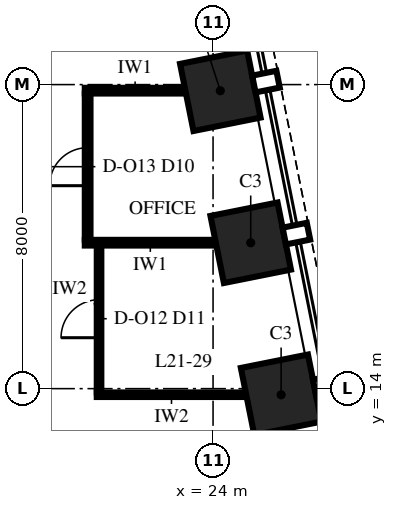
"""IFC4 building model, lengths in metres.
Left out: names, types, materials, properties, quantities, classifications, styles, units other than length and angle.
Written with IfcOpenShell. Run it as: python <this file> out.ifc"""

import sys

from ifc_helpers import new_model, si_unit, direction, frame, frame_2d, origin, origin_2d, place, context, subcontext, project, spatial, rectangle, extrude, element, fill, save


model = new_model("IFC4")
c1 = context("Model", 3, precision=1e-05, world=origin(), true_north=direction((0.0, 1.0)))
c2 = subcontext(c1, "Body", "Model", "MODEL_VIEW")
j1 = project(units=[si_unit("LENGTHUNIT", "METRE"), si_unit("PLANEANGLEUNIT", "RADIAN")], contexts=[c1])
p1 = place(None, origin())
s1 = spatial("IfcSite", under=j1, at=p1, CompositionType="ELEMENT")
p2 = place(p1, origin())
s2 = spatial("IfcBuilding", under=s1, at=p2, CompositionType="ELEMENT")
p3 = place(p2, frame((0.0, 0.0, 98.0)))
s3 = spatial("IfcBuildingStorey", under=s2, at=p3, CompositionType="ELEMENT", Elevation=98.0)
for number, where, z_axis, x_axis in (
    (1, (25.791, 13.838, 0.0), (0.0, 0.0, 1.0), (-0.196, 0.981, 0.0)),
    (2, (24.991, 17.838, 0.0), (0.0, 0.0, 1.0), (-0.196, 0.981, 0.0)),
    (3, (24.191, 21.838, 0.0), (0.0, 0.0, 1.0), (-0.196, 0.981, 0.0)),
):
    element("IfcColumn", number, at=place(p3, frame(where, z_axis=z_axis, x_axis=x_axis)), inside=s3, PredefinedType="COLUMN", context=c2, shape_type="SweptSolid", body=[
        extrude(rectangle(XDim=1.8, YDim=1.8, at=origin_2d()), origin(), (0.0, 0.0, 1.0), 5.0),
    ])
p4 = place(p3, frame((20.94, 13.84, 0.0), z_axis=(0.0, 0.0, 1.0), x_axis=(1.0, 0.0, 0.0)))
e4 = element("IfcWall", 4, at=p4, inside=s3, PredefinedType="PARTITIONING", context=c2, shape_type="SweptSolid", body=[
    extrude(rectangle(XDim=3.933, YDim=0.12, at=frame_2d((1.966, 0.0))), origin(), (0.0, 0.0, 1.0), 4.25),
])
p5 = place(p3, frame((20.625, 17.84, 0.0), z_axis=(0.0, 0.0, 1.0), x_axis=(1.0, 0.0, 0.0)))
e5 = element("IfcWall", 5, at=p5, inside=s3, PredefinedType="PARTITIONING", context=c2, shape_type="SweptSolid", body=[
    extrude(rectangle(XDim=3.448, YDim=0.15, at=frame_2d((1.724, 0.0))), origin(), (0.0, 0.0, 1.0), 4.25),
])
p6 = place(p3, frame((20.625, 21.84, 0.0), z_axis=(0.0, 0.0, 1.0), x_axis=(1.0, 0.0, 0.0)))
e6 = element("IfcWall", 6, at=p6, inside=s3, PredefinedType="PARTITIONING", context=c2, shape_type="SweptSolid", body=[
    extrude(rectangle(XDim=2.648, YDim=0.15, at=frame_2d((1.324, 0.0))), origin(), (0.0, 0.0, 1.0), 4.25),
])
p7 = place(p3, frame((20.7, 17.915, 0.0), z_axis=(0.0, 0.0, 1.0), x_axis=(0.0, 1.0, 0.0)))
e7 = element("IfcWall", 7, at=p7, inside=s3, PredefinedType="PARTITIONING", context=c2, shape_type="SweptSolid", body=[
    extrude(rectangle(XDim=3.85, YDim=0.15, at=frame_2d((1.925, 0.0))), origin(), (0.0, 0.0, 1.0), 4.25),
])
p8 = place(p7, frame((1.425, 0.0, 0.0)))
e8 = element("IfcOpeningElement", 8, at=p8, cuts=e7, PredefinedType="OPENING", context=c2, shape_type="SweptSolid", body=[
    extrude(rectangle(XDim=1.0, YDim=2.3, at=frame_2d((0.5, 1.15))), frame((0.0, 0.09, 0.0), z_axis=(0.0, -1.0, 0.0), x_axis=(1.0, 0.0, 0.0)), (0.0, 0.0, 1.0), 0.18),
])
p9 = place(p3, frame((21.0, 13.9, 0.0), z_axis=(0.0, 0.0, 1.0), x_axis=(0.0, 1.0, 0.0)))
e9 = element("IfcWall", 9, at=p9, inside=s3, PredefinedType="PARTITIONING", context=c2, shape_type="SweptSolid", body=[
    extrude(rectangle(XDim=3.865, YDim=0.12, at=frame_2d((1.933, 0.0))), origin(), (0.0, 0.0, 1.0), 4.25),
])
p10 = place(p9, frame((1.44, 0.0, 0.0)))
e10 = element("IfcOpeningElement", 10, at=p10, cuts=e9, PredefinedType="OPENING", context=c2, shape_type="SweptSolid", body=[
    extrude(rectangle(XDim=1.0, YDim=2.4, at=frame_2d((0.5, 1.2))), frame((0.0, 0.075, 0.0), z_axis=(0.0, -1.0, 0.0), x_axis=(1.0, 0.0, 0.0)), (0.0, 0.0, 1.0), 0.15),
])
p11 = place(p10, origin())
e11 = element("IfcDoor", 11, at=p11, inside=s3, OperationType="SINGLE_SWING_RIGHT", PredefinedType="DOOR", context=c2, shape_type="SweptSolid", body=[
    extrude(rectangle(XDim=1.0, YDim=2.4, at=frame_2d((0.5, 1.2))), frame((0.0, 0.06, 0.0), z_axis=(0.0, -1.0, 0.0), x_axis=(1.0, 0.0, 0.0)), (0.0, 0.0, 1.0), 0.12),
])
fill(e10, e11)
p12 = place(p8, origin())
e12 = element("IfcDoor", 12, at=p12, inside=s3, OperationType="SINGLE_SWING_LEFT", PredefinedType="DOOR", context=c2, shape_type="SweptSolid", body=[
    extrude(rectangle(XDim=1.0, YDim=2.3, at=frame_2d((0.5, 1.15))), frame((0.0, 0.075, 0.0), z_axis=(0.0, -1.0, 0.0), x_axis=(1.0, 0.0, 0.0)), (0.0, 0.0, 1.0), 0.149),
])
fill(e8, e12)
save(model, sys.argv[1])
